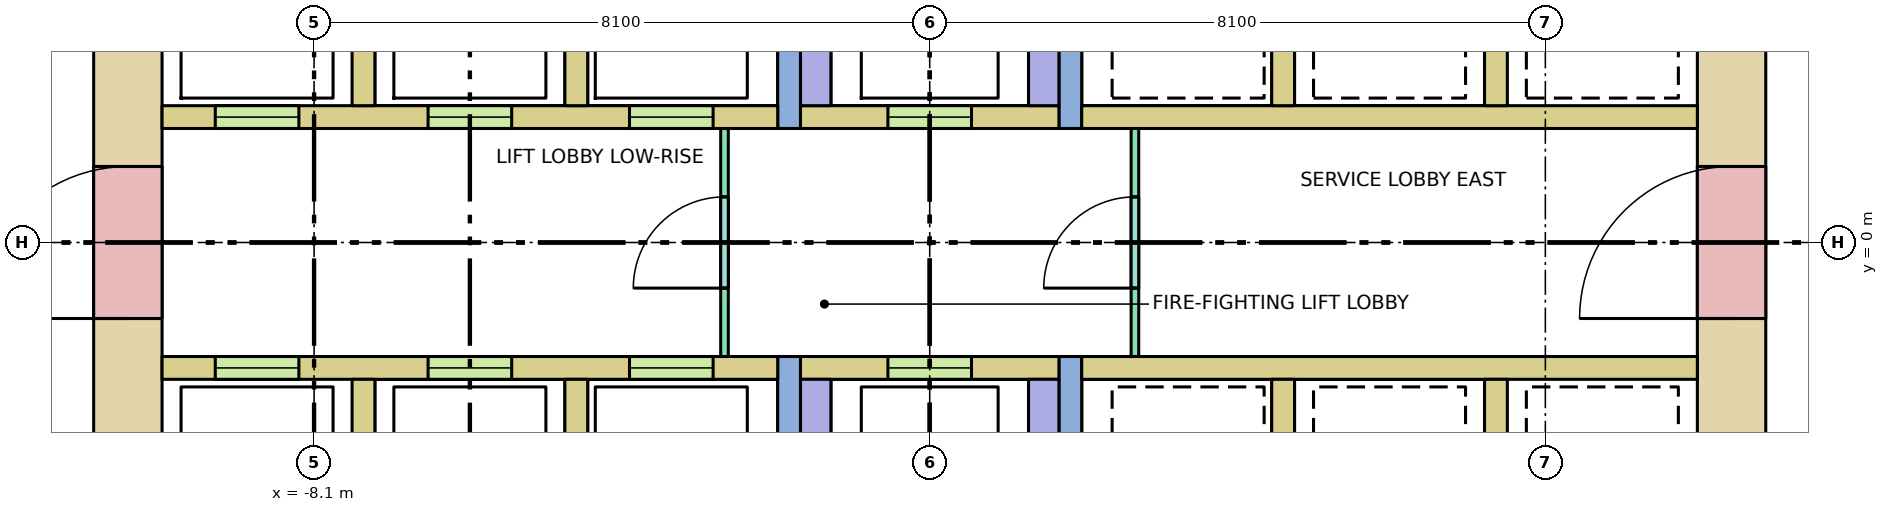
"""IFC4 building model, lengths in metres.
Left out: names, types, materials, properties, quantities, classifications, styles, units other than length and angle.
Written with IfcOpenShell. Run it as: python <this file> out.ifc"""

import sys

from ifc_helpers import new_model, si_unit, direction, frame, frame_2d, origin, place, context, subcontext, project, spatial, rectangle, extrude, element, fill, save


model = new_model("IFC4")
c1 = context("Model", 3, precision=1e-05, world=origin(), true_north=direction((0.0, 1.0)))
c2 = subcontext(c1, "Body", "Model", "MODEL_VIEW")
j1 = project(units=[si_unit("LENGTHUNIT", "METRE"), si_unit("PLANEANGLEUNIT", "RADIAN")], contexts=[c1])
p1 = place(None, origin())
s1 = spatial("IfcSite", under=j1, at=p1, CompositionType="ELEMENT")
p2 = place(p1, origin())
s2 = spatial("IfcBuilding", under=s1, at=p2, CompositionType="ELEMENT")
p3 = place(p2, frame((0.0, 0.0, 110.6)))
s3 = spatial("IfcBuildingStorey", under=s2, at=p3, CompositionType="ELEMENT", Elevation=110.6)
p4 = place(p3, frame((-10.55, -5.13, -0.28), z_axis=(0.0, 0.0, 1.0), x_axis=(0.0, 1.0, 0.0)))
e1 = element("IfcWall", 1, at=p4, inside=s3, PredefinedType="SHEAR", context=c2, shape_type="SweptSolid", body=[
    extrude(rectangle(XDim=10.26, YDim=0.9, at=frame_2d((5.13, 0.0))), origin(), (0.0, 0.0, 1.0), 5.6),
])
p5 = place(p4, frame((4.13, 0.0, 0.28)))
e2 = element("IfcOpeningElement", 2, at=p5, cuts=e1, PredefinedType="OPENING", context=c2, shape_type="SweptSolid", body=[
    extrude(rectangle(XDim=2.0, YDim=2.1, at=frame_2d((1.0, 1.05))), frame((0.0, 0.46, 0.0), z_axis=(0.0, -1.0, 0.0), x_axis=(1.0, 0.0, 0.0)), (0.0, 0.0, 1.0), 0.92),
])
p6 = place(p3, frame((10.55, -5.13, -0.28), z_axis=(0.0, 0.0, 1.0), x_axis=(0.0, 1.0, 0.0)))
e3 = element("IfcWall", 3, at=p6, inside=s3, PredefinedType="SHEAR", context=c2, shape_type="SweptSolid", body=[
    extrude(rectangle(XDim=10.26, YDim=0.9, at=frame_2d((5.13, 0.0))), origin(), (0.0, 0.0, 1.0), 5.6),
])
p7 = place(p6, frame((4.13, 0.0, 0.28)))
e4 = element("IfcOpeningElement", 4, at=p7, cuts=e3, PredefinedType="OPENING", context=c2, shape_type="SweptSolid", body=[
    extrude(rectangle(XDim=2.0, YDim=2.1, at=frame_2d((1.0, 1.05))), frame((0.0, 0.46, 0.0), z_axis=(0.0, -1.0, 0.0), x_axis=(1.0, 0.0, 0.0)), (0.0, 0.0, 1.0), 0.92),
])
p8 = place(p3, frame((-10.1, 1.65, 0.0), z_axis=(0.0, 0.0, 1.0), x_axis=(1.0, 0.0, 0.0)))
e5 = element("IfcWall", 5, at=p8, inside=s3, PredefinedType="SOLIDWALL", context=c2, shape_type="SweptSolid", body=[
    extrude(rectangle(XDim=8.1, YDim=0.3, at=frame_2d((4.05, 0.0))), origin(), (0.0, 0.0, 1.0), 5.32),
])
p9 = place(p8, frame((0.7, 0.0, 0.0)))
e6 = element("IfcOpeningElement", 6, at=p9, cuts=e5, PredefinedType="OPENING", context=c2, shape_type="SweptSolid", body=[
    extrude(rectangle(XDim=1.1, YDim=2.1, at=frame_2d((0.55, 1.05))), frame((0.0, 0.16, 0.0), z_axis=(0.0, -1.0, 0.0), x_axis=(1.0, 0.0, 0.0)), (0.0, 0.0, 1.0), 0.32),
])
p10 = place(p8, frame((3.5, 0.0, 0.0)))
e7 = element("IfcOpeningElement", 7, at=p10, cuts=e5, PredefinedType="OPENING", context=c2, shape_type="SweptSolid", body=[
    extrude(rectangle(XDim=1.1, YDim=2.1, at=frame_2d((0.55, 1.05))), frame((0.0, 0.16, 0.0), z_axis=(0.0, -1.0, 0.0), x_axis=(1.0, 0.0, 0.0)), (0.0, 0.0, 1.0), 0.32),
])
p11 = place(p8, frame((6.15, 0.0, 0.0)))
e8 = element("IfcOpeningElement", 8, at=p11, cuts=e5, PredefinedType="OPENING", context=c2, shape_type="SweptSolid", body=[
    extrude(rectangle(XDim=1.1, YDim=2.1, at=frame_2d((0.55, 1.05))), frame((0.0, 0.16, 0.0), z_axis=(0.0, -1.0, 0.0), x_axis=(1.0, 0.0, 0.0)), (0.0, 0.0, 1.0), 0.32),
])
p12 = place(p3, frame((-10.1, -1.65, 0.0), z_axis=(0.0, 0.0, 1.0), x_axis=(1.0, 0.0, 0.0)))
e9 = element("IfcWall", 9, at=p12, inside=s3, PredefinedType="SOLIDWALL", context=c2, shape_type="SweptSolid", body=[
    extrude(rectangle(XDim=8.1, YDim=0.3, at=frame_2d((4.05, 0.0))), origin(), (0.0, 0.0, 1.0), 5.32),
])
p13 = place(p12, frame((0.7, 0.0, 0.0)))
e10 = element("IfcOpeningElement", 10, at=p13, cuts=e9, PredefinedType="OPENING", context=c2, shape_type="SweptSolid", body=[
    extrude(rectangle(XDim=1.1, YDim=2.1, at=frame_2d((0.55, 1.05))), frame((0.0, 0.16, 0.0), z_axis=(0.0, -1.0, 0.0), x_axis=(1.0, 0.0, 0.0)), (0.0, 0.0, 1.0), 0.32),
])
p14 = place(p12, frame((3.5, 0.0, 0.0)))
e11 = element("IfcOpeningElement", 11, at=p14, cuts=e9, PredefinedType="OPENING", context=c2, shape_type="SweptSolid", body=[
    extrude(rectangle(XDim=1.1, YDim=2.1, at=frame_2d((0.55, 1.05))), frame((0.0, 0.16, 0.0), z_axis=(0.0, -1.0, 0.0), x_axis=(1.0, 0.0, 0.0)), (0.0, 0.0, 1.0), 0.32),
])
p15 = place(p12, frame((6.15, 0.0, 0.0)))
e12 = element("IfcOpeningElement", 12, at=p15, cuts=e9, PredefinedType="OPENING", context=c2, shape_type="SweptSolid", body=[
    extrude(rectangle(XDim=1.1, YDim=2.1, at=frame_2d((0.55, 1.05))), frame((0.0, 0.16, 0.0), z_axis=(0.0, -1.0, 0.0), x_axis=(1.0, 0.0, 0.0)), (0.0, 0.0, 1.0), 0.32),
])
for number, where, z_axis, x_axis in (
    (13, (2.0, 1.65, 0.0), (0.0, 0.0, 1.0), (1.0, 0.0, 0.0)),
    (14, (2.0, -1.65, 0.0), (0.0, 0.0, 1.0), (1.0, 0.0, 0.0)),
):
    element("IfcWall", number, at=place(p3, frame(where, z_axis=z_axis, x_axis=x_axis)), inside=s3, PredefinedType="SOLIDWALL", context=c2, shape_type="SweptSolid", body=[
        extrude(rectangle(XDim=8.1, YDim=0.3, at=frame_2d((4.05, 0.0))), origin(), (0.0, 0.0, 1.0), 5.32),
    ])
for number, where, z_axis, x_axis in (
    (15, (-7.45, 1.8, 0.0), (0.0, 0.0, 1.0), (0.0, 1.0, 0.0)),
    (16, (-7.45, -4.2, 0.0), (0.0, 0.0, 1.0), (0.0, 1.0, 0.0)),
    (17, (-4.65, 1.8, 0.0), (0.0, 0.0, 1.0), (0.0, 1.0, 0.0)),
    (18, (-4.65, -4.2, 0.0), (0.0, 0.0, 1.0), (0.0, 1.0, 0.0)),
    (19, (4.65, 1.8, 0.0), (0.0, 0.0, 1.0), (0.0, 1.0, 0.0)),
    (20, (4.65, -4.2, 0.0), (0.0, 0.0, 1.0), (0.0, 1.0, 0.0)),
    (21, (7.45, 1.8, 0.0), (0.0, 0.0, 1.0), (0.0, 1.0, 0.0)),
    (22, (7.45, -4.2, 0.0), (0.0, 0.0, 1.0), (0.0, 1.0, 0.0)),
):
    element("IfcWall", number, at=place(p3, frame(where, z_axis=z_axis, x_axis=x_axis)), inside=s3, PredefinedType="SOLIDWALL", context=c2, shape_type="SweptSolid", body=[
        extrude(rectangle(XDim=2.4, YDim=0.3, at=frame_2d((1.2, 0.0))), origin(), (0.0, 0.0, 1.0), 5.32),
    ])
for number, where, z_axis, x_axis in (
    (23, (-1.85, 1.5, 0.0), (0.0, 0.0, 1.0), (0.0, 1.0, 0.0)),
    (24, (-1.85, -8.1, 0.0), (0.0, 0.0, 1.0), (0.0, 1.0, 0.0)),
    (25, (1.85, 1.5, 0.0), (0.0, 0.0, 1.0), (0.0, 1.0, 0.0)),
    (26, (1.85, -8.1, 0.0), (0.0, 0.0, 1.0), (0.0, 1.0, 0.0)),
):
    element("IfcWall", number, at=place(p3, frame(where, z_axis=z_axis, x_axis=x_axis)), inside=s3, PredefinedType="SHEAR", context=c2, shape_type="SweptSolid", body=[
        extrude(rectangle(XDim=6.6, YDim=0.3, at=frame_2d((3.3, 0.0))), origin(), (0.0, 0.0, 1.0), 5.32),
    ])
p16 = place(p3, frame((-1.7, 1.65, 0.0), z_axis=(0.0, 0.0, 1.0), x_axis=(1.0, 0.0, 0.0)))
e27 = element("IfcWall", 27, at=p16, inside=s3, PredefinedType="SOLIDWALL", context=c2, shape_type="SweptSolid", body=[
    extrude(rectangle(XDim=3.4, YDim=0.3, at=frame_2d((1.7, 0.0))), origin(), (0.0, 0.0, 1.0), 5.32),
])
p17 = place(p16, frame((1.15, 0.0, 0.0)))
e28 = element("IfcOpeningElement", 28, at=p17, cuts=e27, PredefinedType="OPENING", context=c2, shape_type="SweptSolid", body=[
    extrude(rectangle(XDim=1.1, YDim=2.1, at=frame_2d((0.55, 1.05))), frame((0.0, 0.16, 0.0), z_axis=(0.0, -1.0, 0.0), x_axis=(1.0, 0.0, 0.0)), (0.0, 0.0, 1.0), 0.32),
])
p18 = place(p3, frame((-1.7, -1.65, 0.0), z_axis=(0.0, 0.0, 1.0), x_axis=(1.0, 0.0, 0.0)))
e29 = element("IfcWall", 29, at=p18, inside=s3, PredefinedType="SOLIDWALL", context=c2, shape_type="SweptSolid", body=[
    extrude(rectangle(XDim=3.4, YDim=0.3, at=frame_2d((1.7, 0.0))), origin(), (0.0, 0.0, 1.0), 5.32),
])
p19 = place(p18, frame((1.15, 0.0, 0.0)))
e30 = element("IfcOpeningElement", 30, at=p19, cuts=e29, PredefinedType="OPENING", context=c2, shape_type="SweptSolid", body=[
    extrude(rectangle(XDim=1.1, YDim=2.1, at=frame_2d((0.55, 1.05))), frame((0.0, 0.16, 0.0), z_axis=(0.0, -1.0, 0.0), x_axis=(1.0, 0.0, 0.0)), (0.0, 0.0, 1.0), 0.32),
])
for number, where, z_axis, x_axis in (
    (31, (-1.5, 1.8, 0.0), (0.0, 0.0, 1.0), (0.0, 1.0, 0.0)),
    (32, (-1.5, -4.8, 0.0), (0.0, 0.0, 1.0), (0.0, 1.0, 0.0)),
    (33, (1.5, 1.8, 0.0), (0.0, 0.0, 1.0), (0.0, 1.0, 0.0)),
    (34, (1.5, -4.8, 0.0), (0.0, 0.0, 1.0), (0.0, 1.0, 0.0)),
):
    element("IfcWall", number, at=place(p3, frame(where, z_axis=z_axis, x_axis=x_axis)), inside=s3, PredefinedType="SOLIDWALL", context=c2, shape_type="SweptSolid", body=[
        extrude(rectangle(XDim=3.0, YDim=0.4, at=frame_2d((1.5, 0.0))), origin(), (0.0, 0.0, 1.0), 5.32),
    ])
p20 = place(p3, frame((-2.7, -1.5, 0.0), z_axis=(0.0, 0.0, 1.0), x_axis=(0.0, 1.0, 0.0)))
e35 = element("IfcWall", 35, at=p20, inside=s3, PredefinedType="PARTITIONING", context=c2, shape_type="SweptSolid", body=[
    extrude(rectangle(XDim=3.0, YDim=0.1, at=frame_2d((1.5, 0.0))), origin(), (0.0, 0.0, 1.0), 5.32),
])
p21 = place(p20, frame((0.9, 0.0, 0.0)))
e36 = element("IfcOpeningElement", 36, at=p21, cuts=e35, PredefinedType="OPENING", context=c2, shape_type="SweptSolid", body=[
    extrude(rectangle(XDim=1.2, YDim=2.1, at=frame_2d((0.6, 1.05))), frame((0.0, 0.06, 0.0), z_axis=(0.0, -1.0, 0.0), x_axis=(1.0, 0.0, 0.0)), (0.0, 0.0, 1.0), 0.12),
])
p22 = place(p3, frame((2.7, -1.5, 0.0), z_axis=(0.0, 0.0, 1.0), x_axis=(0.0, 1.0, 0.0)))
e37 = element("IfcWall", 37, at=p22, inside=s3, PredefinedType="PARTITIONING", context=c2, shape_type="SweptSolid", body=[
    extrude(rectangle(XDim=3.0, YDim=0.1, at=frame_2d((1.5, 0.0))), origin(), (0.0, 0.0, 1.0), 5.32),
])
p23 = place(p22, frame((0.9, 0.0, 0.0)))
e38 = element("IfcOpeningElement", 38, at=p23, cuts=e37, PredefinedType="OPENING", context=c2, shape_type="SweptSolid", body=[
    extrude(rectangle(XDim=1.2, YDim=2.1, at=frame_2d((0.6, 1.05))), frame((0.0, 0.06, 0.0), z_axis=(0.0, -1.0, 0.0), x_axis=(1.0, 0.0, 0.0)), (0.0, 0.0, 1.0), 0.12),
])
p24 = place(p9, origin())
e39 = element("IfcDoor", 39, at=p24, inside=s3, OperationType="DOUBLE_DOOR_SLIDING", PredefinedType="DOOR", context=c2, shape_type="SweptSolid", body=[
    extrude(rectangle(XDim=1.1, YDim=2.1, at=frame_2d((0.55, 1.05))), frame((0.0, 0.025, 0.0), z_axis=(0.0, -1.0, 0.0), x_axis=(1.0, 0.0, 0.0)), (0.0, 0.0, 1.0), 0.05),
])
fill(e6, e39)
p25 = place(p10, origin())
e40 = element("IfcDoor", 40, at=p25, inside=s3, OperationType="DOUBLE_DOOR_SLIDING", PredefinedType="DOOR", context=c2, shape_type="SweptSolid", body=[
    extrude(rectangle(XDim=1.1, YDim=2.1, at=frame_2d((0.55, 1.05))), frame((0.0, 0.025, 0.0), z_axis=(0.0, -1.0, 0.0), x_axis=(1.0, 0.0, 0.0)), (0.0, 0.0, 1.0), 0.05),
])
fill(e7, e40)
p26 = place(p11, origin())
e41 = element("IfcDoor", 41, at=p26, inside=s3, OperationType="DOUBLE_DOOR_SLIDING", PredefinedType="DOOR", context=c2, shape_type="SweptSolid", body=[
    extrude(rectangle(XDim=1.1, YDim=2.1, at=frame_2d((0.55, 1.05))), frame((0.0, 0.025, 0.0), z_axis=(0.0, -1.0, 0.0), x_axis=(1.0, 0.0, 0.0)), (0.0, 0.0, 1.0), 0.05),
])
fill(e8, e41)
p27 = place(p13, origin())
e42 = element("IfcDoor", 42, at=p27, inside=s3, OperationType="DOUBLE_DOOR_SLIDING", PredefinedType="DOOR", context=c2, shape_type="SweptSolid", body=[
    extrude(rectangle(XDim=1.1, YDim=2.1, at=frame_2d((0.55, 1.05))), frame((0.0, 0.025, 0.0), z_axis=(0.0, -1.0, 0.0), x_axis=(1.0, 0.0, 0.0)), (0.0, 0.0, 1.0), 0.05),
])
fill(e10, e42)
p28 = place(p14, origin())
e43 = element("IfcDoor", 43, at=p28, inside=s3, OperationType="DOUBLE_DOOR_SLIDING", PredefinedType="DOOR", context=c2, shape_type="SweptSolid", body=[
    extrude(rectangle(XDim=1.1, YDim=2.1, at=frame_2d((0.55, 1.05))), frame((0.0, 0.025, 0.0), z_axis=(0.0, -1.0, 0.0), x_axis=(1.0, 0.0, 0.0)), (0.0, 0.0, 1.0), 0.05),
])
fill(e11, e43)
p29 = place(p15, origin())
e44 = element("IfcDoor", 44, at=p29, inside=s3, OperationType="DOUBLE_DOOR_SLIDING", PredefinedType="DOOR", context=c2, shape_type="SweptSolid", body=[
    extrude(rectangle(XDim=1.1, YDim=2.1, at=frame_2d((0.55, 1.05))), frame((0.0, 0.025, 0.0), z_axis=(0.0, -1.0, 0.0), x_axis=(1.0, 0.0, 0.0)), (0.0, 0.0, 1.0), 0.05),
])
fill(e12, e44)
p30 = place(p17, origin())
e45 = element("IfcDoor", 45, at=p30, inside=s3, OperationType="DOUBLE_DOOR_SLIDING", PredefinedType="DOOR", context=c2, shape_type="SweptSolid", body=[
    extrude(rectangle(XDim=1.1, YDim=2.1, at=frame_2d((0.55, 1.05))), frame((0.0, 0.025, 0.0), z_axis=(0.0, -1.0, 0.0), x_axis=(1.0, 0.0, 0.0)), (0.0, 0.0, 1.0), 0.05),
])
fill(e28, e45)
p31 = place(p19, origin())
e46 = element("IfcDoor", 46, at=p31, inside=s3, OperationType="DOUBLE_DOOR_SLIDING", PredefinedType="DOOR", context=c2, shape_type="SweptSolid", body=[
    extrude(rectangle(XDim=1.1, YDim=2.1, at=frame_2d((0.55, 1.05))), frame((0.0, 0.025, 0.0), z_axis=(0.0, -1.0, 0.0), x_axis=(1.0, 0.0, 0.0)), (0.0, 0.0, 1.0), 0.05),
])
fill(e30, e46)
p32 = place(p5, origin())
e47 = element("IfcDoor", 47, at=p32, inside=s3, OperationType="DOUBLE_DOOR_SINGLE_SWING", PredefinedType="DOOR", context=c2, shape_type="SweptSolid", body=[
    extrude(rectangle(XDim=2.0, YDim=2.1, at=frame_2d((1.0, 1.05))), frame((0.0, 0.025, 0.0), z_axis=(0.0, -1.0, 0.0), x_axis=(1.0, 0.0, 0.0)), (0.0, 0.0, 1.0), 0.05),
])
fill(e2, e47)
p33 = place(p7, origin())
e48 = element("IfcDoor", 48, at=p33, inside=s3, OperationType="DOUBLE_DOOR_SINGLE_SWING", PredefinedType="DOOR", context=c2, shape_type="SweptSolid", body=[
    extrude(rectangle(XDim=2.0, YDim=2.1, at=frame_2d((1.0, 1.05))), frame((0.0, 0.025, 0.0), z_axis=(0.0, -1.0, 0.0), x_axis=(1.0, 0.0, 0.0)), (0.0, 0.0, 1.0), 0.05),
])
fill(e4, e48)
p34 = place(p21, origin())
e49 = element("IfcDoor", 49, at=p34, inside=s3, OperationType="SINGLE_SWING_LEFT", PredefinedType="DOOR", context=c2, shape_type="SweptSolid", body=[
    extrude(rectangle(XDim=1.2, YDim=2.1, at=frame_2d((0.6, 1.05))), frame((0.0, 0.025, 0.0), z_axis=(0.0, -1.0, 0.0), x_axis=(1.0, 0.0, 0.0)), (0.0, 0.0, 1.0), 0.05),
])
fill(e36, e49)
p35 = place(p23, origin())
e50 = element("IfcDoor", 50, at=p35, inside=s3, OperationType="SINGLE_SWING_LEFT", PredefinedType="DOOR", context=c2, shape_type="SweptSolid", body=[
    extrude(rectangle(XDim=1.2, YDim=2.1, at=frame_2d((0.6, 1.05))), frame((0.0, 0.025, 0.0), z_axis=(0.0, -1.0, 0.0), x_axis=(1.0, 0.0, 0.0)), (0.0, 0.0, 1.0), 0.05),
])
fill(e38, e50)
save(model, sys.argv[1])
